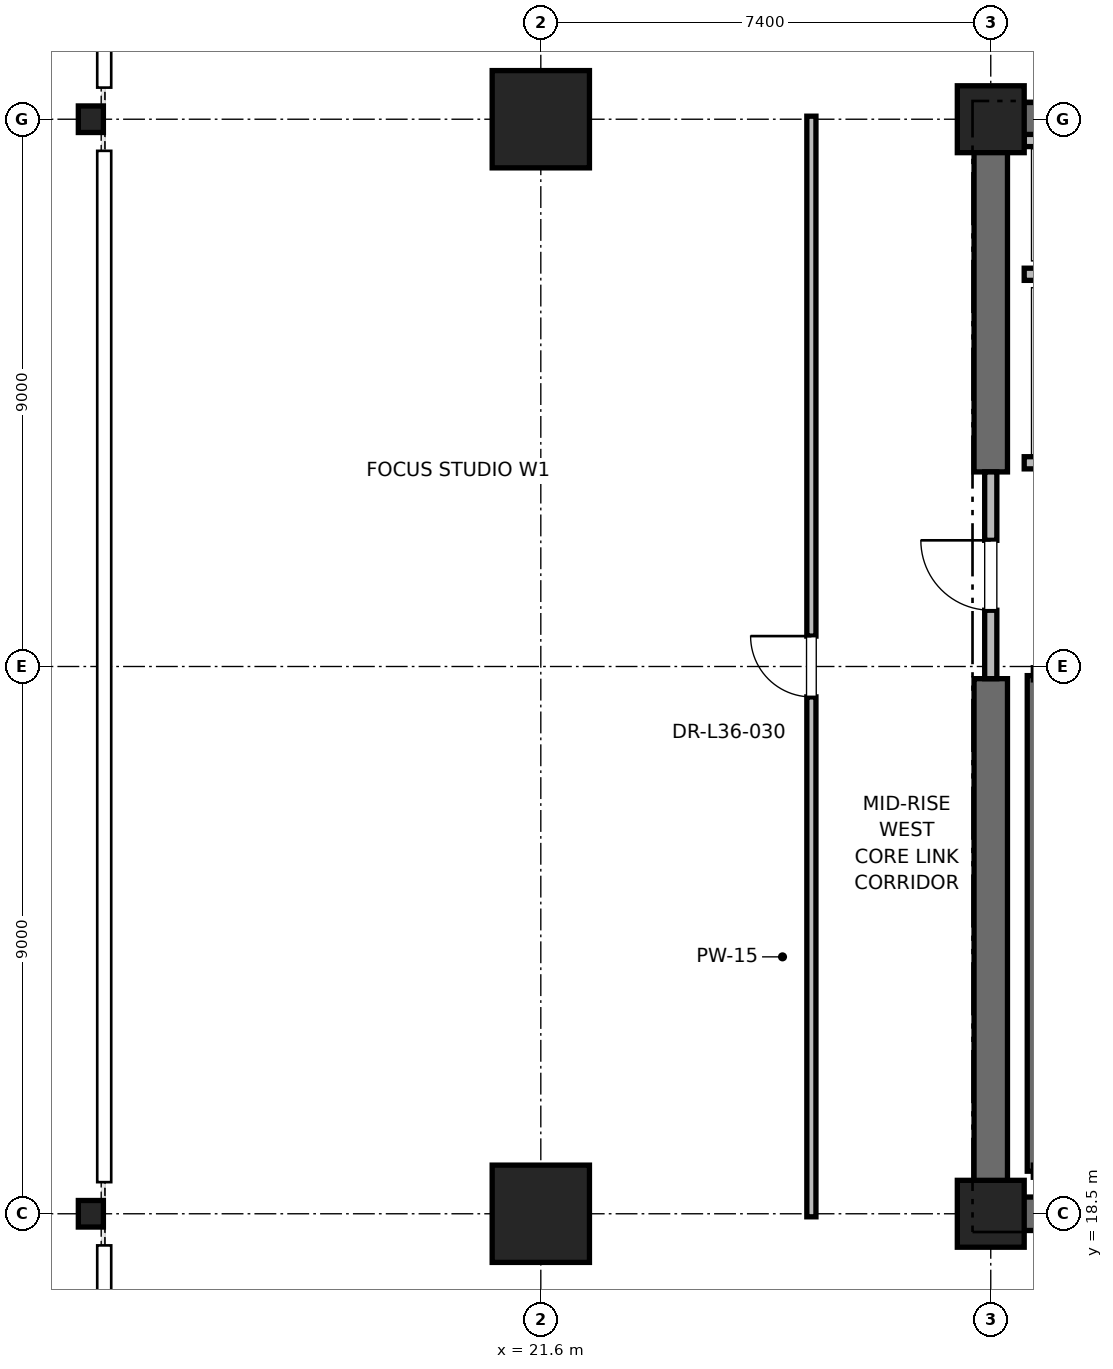
"""IFC4 building model, lengths in metres.
Left out: names, types, materials, properties, quantities, classifications, styles, units other than length and angle.
Written with IfcOpenShell. Run it as: python <this file> out.ifc"""

import sys

from ifc_helpers import new_model, si_unit, direction, frame, frame_2d, origin, origin_2d, place, context, subcontext, project, spatial, rectangle, i_section, extrude, element, fill, save


model = new_model("IFC4")
c1 = context("Model", 3, precision=1e-05, world=origin(), true_north=direction((0.0, 1.0)))
c2 = subcontext(c1, "Body", "Model", "MODEL_VIEW")
j1 = project(units=[si_unit("LENGTHUNIT", "METRE"), si_unit("PLANEANGLEUNIT", "RADIAN")], contexts=[c1])
p1 = place(None, origin())
s1 = spatial("IfcSite", under=j1, at=p1, CompositionType="ELEMENT")
p2 = place(p1, origin())
s2 = spatial("IfcBuilding", under=s1, at=p2, CompositionType="ELEMENT")
p3 = place(p2, frame((0.0, 0.0, 156.4)))
s3 = spatial("IfcBuildingStorey", under=s2, at=p3, CompositionType="ELEMENT", Elevation=156.4)
for number, where, z_axis, x_axis in (
    (1, (21.6, 18.5, 0.0), (0.0, 0.0, 1.0), (1.0, 0.0, 0.0)),
    (2, (21.6, 36.5, 0.0), (0.0, 0.0, 1.0), (1.0, 0.0, 0.0)),
):
    element("IfcColumn", number, at=place(p3, frame(where, z_axis=z_axis, x_axis=x_axis)), inside=s3, PredefinedType="COLUMN", context=c2, shape_type="SweptSolid", body=[
        extrude(rectangle(XDim=1.6, YDim=1.6, at=origin_2d()), origin(), (0.0, 0.0, 1.0), 4.0),
    ])
for number, where, z_axis, x_axis in (
    (3, (14.2, 18.5, 0.0), (0.0, 0.0, 1.0), (1.0, 0.0, 0.0)),
    (4, (14.2, 36.5, 0.0), (0.0, 0.0, 1.0), (1.0, 0.0, 0.0)),
):
    element("IfcColumn", number, at=place(p3, frame(where, z_axis=z_axis, x_axis=x_axis)), inside=s3, PredefinedType="COLUMN", context=c2, shape_type="SweptSolid", body=[
        extrude(i_section(OverallWidth=0.412, OverallDepth=0.437, WebThickness=0.036, FlangeThickness=0.058, FilletRadius=0.015, at=origin_2d()), origin(), (0.0, 0.0, 1.0), 4.0),
    ])
for number, where, z_axis, x_axis in (
    (5, (29.0, 18.5, 0.0), (0.0, 0.0, 1.0), (1.0, 0.0, 0.0)),
    (6, (29.0, 36.5, 0.0), (0.0, 0.0, 1.0), (1.0, 0.0, 0.0)),
):
    element("IfcColumn", number, at=place(p3, frame(where, z_axis=z_axis, x_axis=x_axis)), inside=s3, PredefinedType="PILASTER", context=c2, shape_type="SweptSolid", body=[
        extrude(rectangle(XDim=1.1, YDim=1.1, at=origin_2d()), origin(), (0.0, 0.0, 1.0), 4.0),
    ])
p4 = place(p3, frame((29.0, 18.5, 0.0), z_axis=(0.0, 0.0, 1.0), x_axis=(1.0, 0.0, 0.0)))
e7 = element("IfcWall", 7, at=p4, inside=s3, PredefinedType="SHEAR", context=c2, shape_type="SweptSolid", body=[
    extrude(rectangle(XDim=9.2, YDim=0.55, at=frame_2d((4.6, 0.0))), origin(), (0.0, 0.0, 1.0), 3.775),
])
p5 = place(p3, frame((29.0, 36.5, 0.0), z_axis=(0.0, 0.0, 1.0), x_axis=(1.0, 0.0, 0.0)))
e8 = element("IfcWall", 8, at=p5, inside=s3, PredefinedType="SHEAR", context=c2, shape_type="SweptSolid", body=[
    extrude(rectangle(XDim=5.8, YDim=0.55, at=frame_2d((2.9, 0.0))), origin(), (0.0, 0.0, 1.0), 3.775),
])
p6 = place(p3, frame((29.0, 18.5, 0.0), z_axis=(0.0, 0.0, 1.0), x_axis=(0.0, 1.0, 0.0)))
e9 = element("IfcWall", 9, at=p6, inside=s3, PredefinedType="SHEAR", context=c2, shape_type="SweptSolid", body=[
    extrude(rectangle(XDim=8.8, YDim=0.55, at=frame_2d((4.4, 0.0))), origin(), (0.0, 0.0, 1.0), 3.775),
])
p7 = place(p3, frame((29.0, 30.7, 0.0), z_axis=(0.0, 0.0, 1.0), x_axis=(0.0, 1.0, 0.0)))
e10 = element("IfcWall", 10, at=p7, inside=s3, PredefinedType="SHEAR", context=c2, shape_type="SweptSolid", body=[
    extrude(rectangle(XDim=5.8, YDim=0.55, at=frame_2d((2.9, 0.0))), origin(), (0.0, 0.0, 1.0), 3.775),
])
p8 = place(p3, frame((29.7, 19.2, 0.0), z_axis=(0.0, 0.0, 1.0), x_axis=(0.0, 1.0, 0.0)))
e11 = element("IfcWall", 11, at=p8, inside=s3, PredefinedType="SOLIDWALL", context=c2, shape_type="SweptSolid", body=[
    extrude(rectangle(XDim=8.15, YDim=0.2, at=frame_2d((4.075, 0.0))), origin(), (0.0, 0.0, 1.0), 3.775),
])
p9 = place(p3, frame((29.0, 27.3, 0.0), z_axis=(0.0, 0.0, 1.0), x_axis=(0.0, 1.0, 0.0)))
e12 = element("IfcWall", 12, at=p9, inside=s3, PredefinedType="PARTITIONING", context=c2, shape_type="SweptSolid", body=[
    extrude(rectangle(XDim=3.4, YDim=0.2, at=frame_2d((1.7, 0.0))), origin(), (0.0, 0.0, 1.0), 2.755),
])
p10 = place(p9, frame((1.125, 0.0, 0.0)))
e13 = element("IfcOpeningElement", 13, at=p10, cuts=e12, PredefinedType="OPENING", context=c2, shape_type="SweptSolid", body=[
    extrude(rectangle(XDim=1.15, YDim=2.2, at=frame_2d((0.575, 1.1))), frame((0.0, 0.1, 0.0), z_axis=(0.0, -1.0, 0.0), x_axis=(1.0, 0.0, 0.0)), (0.0, 0.0, 1.0), 0.2),
])
p11 = place(p3, frame((29.55, 30.85, 0.0), z_axis=(0.0, 0.0, 1.0), x_axis=(1.0, 0.0, 0.0)))
e14 = element("IfcWall", 14, at=p11, inside=s3, PredefinedType="SOLIDWALL", context=c2, shape_type="SweptSolid", body=[
    extrude(rectangle(XDim=2.6, YDim=0.2, at=frame_2d((1.3, 0.0))), origin(), (0.0, 0.0, 1.0), 2.755),
])
p12 = place(p11, frame((0.75, 0.0, 0.0)))
e15 = element("IfcOpeningElement", 15, at=p12, cuts=e14, PredefinedType="OPENING", context=c2, shape_type="SweptSolid", body=[
    extrude(rectangle(XDim=1.1, YDim=2.2, at=frame_2d((0.55, 1.1))), frame((0.0, 0.1, 0.0), z_axis=(0.0, -1.0, 0.0), x_axis=(1.0, 0.0, 0.0)), (0.0, 0.0, 1.0), 0.2),
])
p13 = place(p3, frame((29.55, 33.95, 0.0), z_axis=(0.0, 0.0, 1.0), x_axis=(1.0, 0.0, 0.0)))
e16 = element("IfcWall", 16, at=p13, inside=s3, PredefinedType="SOLIDWALL", context=c2, shape_type="SweptSolid", body=[
    extrude(rectangle(XDim=2.8, YDim=0.2, at=frame_2d((1.4, 0.0))), origin(), (0.0, 0.0, 1.0), 3.775),
])
p14 = place(p3, frame((32.35, 36.15, 0.0), z_axis=(0.0, 0.0, 1.0), x_axis=(-1.0, 0.0, 0.0)))
e17 = element("IfcWall", 17, at=p14, inside=s3, PredefinedType="SOLIDWALL", context=c2, shape_type="SweptSolid", body=[
    extrude(rectangle(XDim=2.8, YDim=0.2, at=frame_2d((1.4, 0.0))), origin(), (0.0, 0.0, 1.0), 2.985),
])
p15 = place(p3, frame((26.05, 18.45, 0.0), z_axis=(0.0, 0.0, 1.0), x_axis=(0.0, 1.0, 0.0)))
e18 = element("IfcWall", 18, at=p15, inside=s3, PredefinedType="PARTITIONING", context=c2, shape_type="SweptSolid", body=[
    extrude(rectangle(XDim=18.1, YDim=0.15, at=frame_2d((9.05, 0.0))), origin(), (0.0, 0.0, 1.0), 2.85),
])
p16 = place(p15, frame((8.55, 0.0, 0.0)))
e19 = element("IfcOpeningElement", 19, at=p16, cuts=e18, PredefinedType="OPENING", context=c2, shape_type="SweptSolid", body=[
    extrude(rectangle(XDim=1.0, YDim=2.15, at=frame_2d((0.5, 1.075))), frame((0.0, 0.075, 0.0), z_axis=(0.0, -1.0, 0.0), x_axis=(1.0, 0.0, 0.0)), (0.0, 0.0, 1.0), 0.15),
])
p17 = place(p10, origin())
e20 = element("IfcDoor", 20, at=p17, inside=s3, OperationType="SINGLE_SWING_RIGHT", PredefinedType="DOOR", context=c2, shape_type="SweptSolid", body=[
    extrude(rectangle(XDim=1.15, YDim=2.2, at=frame_2d((0.575, 1.1))), frame((0.0, 0.025, 0.0), z_axis=(0.0, -1.0, 0.0), x_axis=(1.0, 0.0, 0.0)), (0.0, 0.0, 1.0), 0.05),
])
fill(e13, e20)
p18 = place(p16, origin())
e21 = element("IfcDoor", 21, at=p18, inside=s3, OperationType="SINGLE_SWING_RIGHT", PredefinedType="DOOR", context=c2, shape_type="SweptSolid", body=[
    extrude(rectangle(XDim=1.0, YDim=2.15, at=frame_2d((0.5, 1.075))), frame((0.0, 0.025, 0.0), z_axis=(0.0, -1.0, 0.0), x_axis=(1.0, 0.0, 0.0)), (0.0, 0.0, 1.0), 0.05),
])
fill(e19, e21)
save(model, sys.argv[1])
